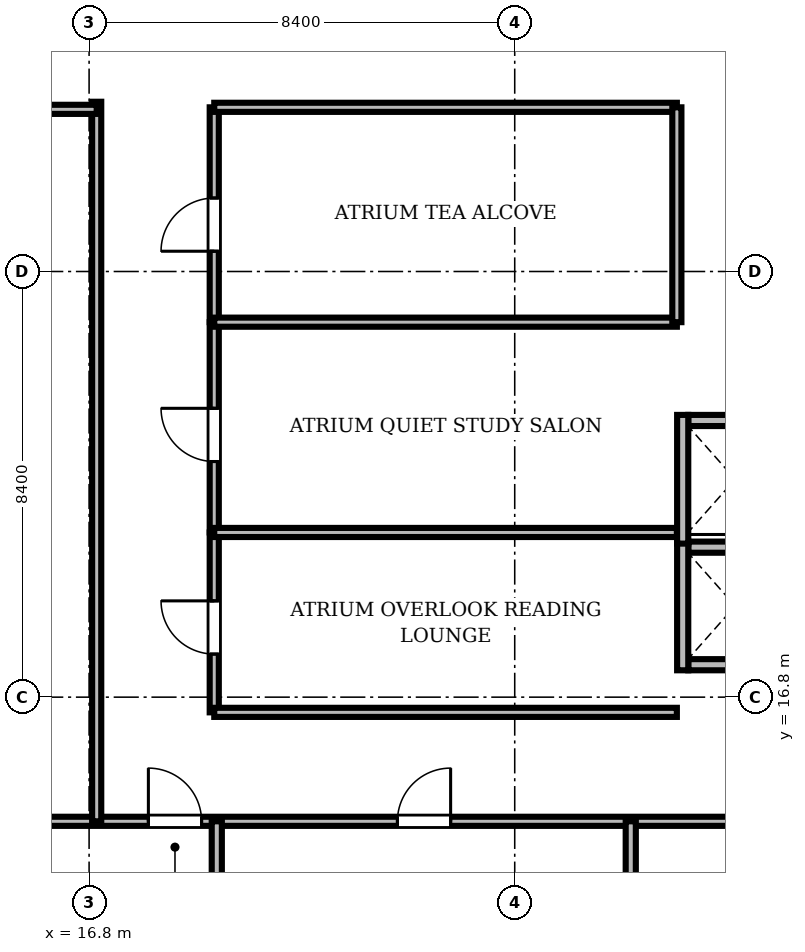
"""IFC4 building model, lengths in metres.
Left out: names, types, materials, properties, quantities, classifications, styles, units other than length and angle.
Written with IfcOpenShell. Run it as: python <this file> out.ifc"""

import sys

from ifc_helpers import new_model, si_unit, direction, frame, frame_2d, origin, place, context, subcontext, project, spatial, rectangle, extrude, source, transform, mapped, element, fill, save


model = new_model("IFC4")
c1 = context("Model", 3, precision=1e-05, world=origin(), true_north=direction((0.0, 1.0)))
c2 = subcontext(c1, "Body", "Model", "MODEL_VIEW")
j1 = project(units=[si_unit("LENGTHUNIT", "METRE"), si_unit("PLANEANGLEUNIT", "RADIAN")], contexts=[c1])
p1 = place(None, origin())
s1 = spatial("IfcSite", under=j1, at=p1, CompositionType="ELEMENT")
p2 = place(p1, origin())
s2 = spatial("IfcBuilding", under=s1, at=p2, CompositionType="ELEMENT")
p3 = place(p2, frame((0.0, 0.0, 159.4)))
s3 = spatial("IfcBuildingStorey", under=s2, at=p3, CompositionType="ELEMENT", Elevation=159.4)
m1 = source(origin(), c2, "Body", "SweptSolid", [
    extrude(rectangle(XDim=1.85, YDim=0.22, at=frame_2d((0.925, 0.0))), origin(), (0.0, 0.0, 1.0), 3.46),
])
for number, where, z_axis, x_axis in (
    (1, (28.625, 17.44, 0.0), (0.0, 0.0, 1.0), (1.0, 0.0, 0.0)),
    (2, (28.625, 19.76, 0.0), (0.0, 0.0, 1.0), (1.0, 0.0, 0.0)),
):
    element("IfcWall", number, at=place(p3, frame(where, z_axis=z_axis, x_axis=x_axis)), inside=s3, PredefinedType="SOLIDWALL", context=c2, shape_type="MappedRepresentation", body=[
        mapped(m1, transform((0.0, 0.0, 0.0), scale=1.0)),
    ])
m2 = source(origin(), c2, "Body", "SweptSolid", [
    extrude(rectangle(XDim=2.54, YDim=0.22, at=frame_2d((1.27, 0.0))), origin(), (0.0, 0.0, 1.0), 3.46),
])
p4 = place(p3, frame((28.515, 17.33, 0.0), z_axis=(0.0, 0.0, 1.0), x_axis=(0.0, 1.0, 0.0)))
e3 = element("IfcWall", 3, at=p4, inside=s3, PredefinedType="SOLIDWALL", context=c2, shape_type="MappedRepresentation", body=[
    mapped(m2, transform((0.0, 0.0, 0.0), scale=1.0)),
])
p5 = place(p3, frame((28.625, 22.26, 0.0), z_axis=(0.0, 0.0, 1.0), x_axis=(1.0, 0.0, 0.0)))
e4 = element("IfcWall", 4, at=p5, inside=s3, PredefinedType="SOLIDWALL", context=c2, shape_type="MappedRepresentation", body=[
    mapped(m1, transform((0.0, 0.0, 0.0), scale=1.0)),
])
p6 = place(p3, frame((28.515, 19.83, 0.0), z_axis=(0.0, 0.0, 1.0), x_axis=(0.0, 1.0, 0.0)))
e5 = element("IfcWall", 5, at=p6, inside=s3, PredefinedType="SOLIDWALL", context=c2, shape_type="MappedRepresentation", body=[
    mapped(m2, transform((0.0, 0.0, 0.0), scale=1.0)),
])
m3 = source(origin(), c2, "Body", "SweptSolid", [
    extrude(rectangle(XDim=46.156, YDim=0.18, at=frame_2d((23.078, 0.0))), origin(), (0.0, 0.0, 1.0), 2.702),
])
p7 = place(p3, frame((6.922, 14.35, 0.0), z_axis=(0.0, 0.0, 1.0), x_axis=(1.0, 0.0, 0.0)))
e6 = element("IfcWall", 6, at=p7, inside=s3, PredefinedType="PARTITIONING", context=c2, shape_type="MappedRepresentation", body=[
    mapped(m3, transform((0.0, 0.0, 0.0), scale=1.0)),
])
m4 = source(origin(), c2, "Body", "SweptSolid", [
    extrude(rectangle(XDim=1.05, YDim=2.2, at=frame_2d((0.525, 1.1))), frame((0.0, 0.1, 0.0), z_axis=(0.0, -1.0, 0.0), x_axis=(1.0, 0.0, 0.0)), (0.0, 0.0, 1.0), 0.2),
])
p8 = place(p7, frame((11.048, 0.0, 0.0)))
e7 = element("IfcOpeningElement", 7, at=p8, cuts=e6, PredefinedType="OPENING", context=c2, shape_type="MappedRepresentation", body=[
    mapped(m4, transform((0.0, 0.0, 0.0), scale=1.0)),
])
p9 = place(p7, frame((15.963, 0.0, 0.0)))
e8 = element("IfcOpeningElement", 8, at=p9, cuts=e6, PredefinedType="OPENING", context=c2, shape_type="MappedRepresentation", body=[
    mapped(m4, transform((0.0, 0.0, 0.0), scale=1.0)),
])
p10 = place(p7, frame((24.133, 0.0, 0.0)))
e9 = element("IfcOpeningElement", 9, at=p10, cuts=e6, PredefinedType="OPENING", context=c2, shape_type="MappedRepresentation", body=[
    mapped(m4, transform((0.0, 0.0, 0.0), scale=1.0)),
])
p11 = place(p7, frame((32.303, 0.0, 0.0)))
e10 = element("IfcOpeningElement", 10, at=p11, cuts=e6, PredefinedType="OPENING", context=c2, shape_type="MappedRepresentation", body=[
    mapped(m4, transform((0.0, 0.0, 0.0), scale=1.0)),
])
p12 = place(p7, frame((40.998, 0.0, 0.0)))
e11 = element("IfcOpeningElement", 11, at=p12, cuts=e6, PredefinedType="OPENING", context=c2, shape_type="MappedRepresentation", body=[
    mapped(m4, transform((0.0, 0.0, 0.0), scale=1.0)),
])
m5 = source(origin(), c2, "Body", "SweptSolid", [
    extrude(rectangle(XDim=4.24, YDim=0.18, at=frame_2d((2.12, 0.0))), origin(), (0.0, 0.0, 1.0), 2.852),
])
p13 = place(p3, frame((19.27, 24.2, 0.0), z_axis=(0.0, 0.0, 1.0), x_axis=(0.0, 1.0, 0.0)))
e12 = element("IfcWall", 12, at=p13, inside=s3, PredefinedType="PARTITIONING", context=c2, shape_type="MappedRepresentation", body=[
    mapped(m5, transform((0.0, 0.0, 0.0), scale=1.0)),
])
p14 = place(p13, frame((1.4, 0.0, 0.0)))
e13 = element("IfcOpeningElement", 13, at=p14, cuts=e12, PredefinedType="OPENING", context=c2, shape_type="MappedRepresentation", body=[
    mapped(m4, transform((0.0, 0.0, 0.0), scale=1.0)),
])
m6 = source(origin(), c2, "Body", "SweptSolid", [
    extrude(rectangle(XDim=4.15, YDim=0.18, at=frame_2d((2.075, 0.0))), origin(), (0.0, 0.0, 1.0), 3.122),
])
p15 = place(p3, frame((19.27, 20.05, 0.0), z_axis=(0.0, 0.0, 1.0), x_axis=(0.0, 1.0, 0.0)))
e14 = element("IfcWall", 14, at=p15, inside=s3, PredefinedType="PARTITIONING", context=c2, shape_type="MappedRepresentation", body=[
    mapped(m6, transform((0.0, 0.0, 0.0), scale=1.0)),
])
p16 = place(p15, frame((1.4, 0.0, 0.0)))
e15 = element("IfcOpeningElement", 15, at=p16, cuts=e14, PredefinedType="OPENING", context=c2, shape_type="MappedRepresentation", body=[
    mapped(m4, transform((0.0, 0.0, 0.0), scale=1.0)),
])
m7 = source(origin(), c2, "Body", "SweptSolid", [
    extrude(rectangle(XDim=3.55, YDim=0.18, at=frame_2d((1.775, 0.0))), origin(), (0.0, 0.0, 1.0), 2.852),
])
p17 = place(p3, frame((19.27, 16.5, 0.0), z_axis=(0.0, 0.0, 1.0), x_axis=(0.0, 1.0, 0.0)))
e16 = element("IfcWall", 16, at=p17, inside=s3, PredefinedType="PARTITIONING", context=c2, shape_type="MappedRepresentation", body=[
    mapped(m7, transform((0.0, 0.0, 0.0), scale=1.0)),
])
p18 = place(p17, frame((1.15, 0.0, 0.0)))
e17 = element("IfcOpeningElement", 17, at=p18, cuts=e16, PredefinedType="OPENING", context=c2, shape_type="MappedRepresentation", body=[
    mapped(m4, transform((0.0, 0.0, 0.0), scale=1.0)),
])
m8 = source(origin(), c2, "Body", "SweptSolid", [
    extrude(rectangle(XDim=14.2, YDim=0.18, at=frame_2d((7.1, 0.0))), origin(), (0.0, 0.0, 1.0), 2.852),
])
p19 = place(p3, frame((16.95, 14.35, 0.0), z_axis=(0.0, 0.0, 1.0), x_axis=(0.0, 1.0, 0.0)))
e18 = element("IfcWall", 18, at=p19, inside=s3, PredefinedType="PARTITIONING", context=c2, shape_type="MappedRepresentation", body=[
    mapped(m8, transform((0.0, 0.0, 0.0), scale=1.0)),
])
m9 = source(origin(), c2, "Body", "SweptSolid", [
    extrude(rectangle(XDim=12.228, YDim=0.2, at=frame_2d((6.114, 0.0))), origin(), (0.0, 0.0, 1.0), 2.702),
])
p20 = place(p3, frame((19.32, 2.122, 0.0), z_axis=(0.0, 0.0, 1.0), x_axis=(0.0, 1.0, 0.0)))
e19 = element("IfcWall", 19, at=p20, inside=s3, PredefinedType="PARTITIONING", context=c2, shape_type="MappedRepresentation", body=[
    mapped(m9, transform((0.0, 0.0, 0.0), scale=1.0)),
])
m10 = source(origin(), c2, "Body", "SweptSolid", [
    extrude(rectangle(XDim=12.42, YDim=0.2, at=frame_2d((6.21, 0.0))), origin(), (0.0, 0.0, 1.0), 2.702),
])
p21 = place(p3, frame((27.49, 1.93, 0.0), z_axis=(0.0, 0.0, 1.0), x_axis=(0.0, 1.0, 0.0)))
e20 = element("IfcWall", 20, at=p21, inside=s3, PredefinedType="PARTITIONING", context=c2, shape_type="MappedRepresentation", body=[
    mapped(m10, transform((0.0, 0.0, 0.0), scale=1.0)),
])
m11 = source(origin(), c2, "Body", "SweptSolid", [
    extrude(rectangle(XDim=10.22, YDim=0.18, at=frame_2d((5.11, 0.0))), origin(), (0.0, 0.0, 1.0), 2.702),
])
p22 = place(p3, frame((6.73, 28.4, 0.0), z_axis=(0.0, 0.0, 1.0), x_axis=(1.0, 0.0, 0.0)))
e21 = element("IfcWall", 21, at=p22, inside=s3, PredefinedType="PARTITIONING", context=c2, shape_type="MappedRepresentation", body=[
    mapped(m11, transform((0.0, 0.0, 0.0), scale=1.0)),
])
m12 = source(origin(), c2, "Body", "SweptSolid", [
    extrude(rectangle(XDim=9.13, YDim=0.18, at=frame_2d((4.565, 0.0))), origin(), (0.0, 0.0, 1.0), 3.46),
])
for number, where, z_axis, x_axis in (
    (22, (19.27, 16.5, 0.0), (0.0, 0.0, 1.0), (1.0, 0.0, 0.0)),
    (23, (19.27, 20.05, 0.0), (0.0, 0.0, 1.0), (1.0, 0.0, 0.0)),
    (24, (19.27, 24.2, 0.0), (0.0, 0.0, 1.0), (1.0, 0.0, 0.0)),
    (25, (19.27, 28.44, 0.0), (0.0, 0.0, 1.0), (1.0, 0.0, 0.0)),
):
    element("IfcWall", number, at=place(p3, frame(where, z_axis=z_axis, x_axis=x_axis)), inside=s3, PredefinedType="PARTITIONING", context=c2, shape_type="MappedRepresentation", body=[
        mapped(m12, transform((0.0, 0.0, 0.0), scale=1.0)),
    ])
p23 = place(p3, frame((28.4, 24.2, 0.0), z_axis=(0.0, 0.0, 1.0), x_axis=(0.0, 1.0, 0.0)))
e26 = element("IfcWall", 26, at=p23, inside=s3, PredefinedType="PARTITIONING", context=c2, shape_type="MappedRepresentation", body=[
    mapped(m5, transform((0.0, 0.0, 0.0), scale=1.0)),
])
m13 = source(origin(), c2, "Body", "SweptSolid", [
    extrude(rectangle(XDim=1.05, YDim=2.2, at=frame_2d((0.525, 1.1))), frame((0.0, 0.025, 0.0), z_axis=(0.0, -1.0, 0.0), x_axis=(1.0, 0.0, 0.0)), (0.0, 0.0, 1.0), 0.05),
])
p24 = place(p8, origin())
e27 = element("IfcDoor", 27, at=p24, inside=s3, OperationType="SINGLE_SWING_LEFT", PredefinedType="DOOR", context=c2, shape_type="MappedRepresentation", body=[
    mapped(m13, transform((0.0, 0.0, 0.0), scale=1.0)),
])
fill(e7, e27)
p25 = place(p9, origin())
e28 = element("IfcDoor", 28, at=p25, inside=s3, OperationType="SINGLE_SWING_RIGHT", PredefinedType="DOOR", context=c2, shape_type="MappedRepresentation", body=[
    mapped(m13, transform((0.0, 0.0, 0.0), scale=1.0)),
])
fill(e8, e28)
p26 = place(p14, origin())
e29 = element("IfcDoor", 29, at=p26, inside=s3, OperationType="SINGLE_SWING_LEFT", PredefinedType="DOOR", context=c2, shape_type="MappedRepresentation", body=[
    mapped(m13, transform((0.0, 0.0, 0.0), scale=1.0)),
])
fill(e13, e29)
p27 = place(p16, origin())
e30 = element("IfcDoor", 30, at=p27, inside=s3, OperationType="SINGLE_SWING_RIGHT", PredefinedType="DOOR", context=c2, shape_type="MappedRepresentation", body=[
    mapped(m13, transform((0.0, 0.0, 0.0), scale=1.0)),
])
fill(e15, e30)
p28 = place(p18, origin())
e31 = element("IfcDoor", 31, at=p28, inside=s3, OperationType="SINGLE_SWING_RIGHT", PredefinedType="DOOR", context=c2, shape_type="MappedRepresentation", body=[
    mapped(m13, transform((0.0, 0.0, 0.0), scale=1.0)),
])
fill(e17, e31)
save(model, sys.argv[1])
